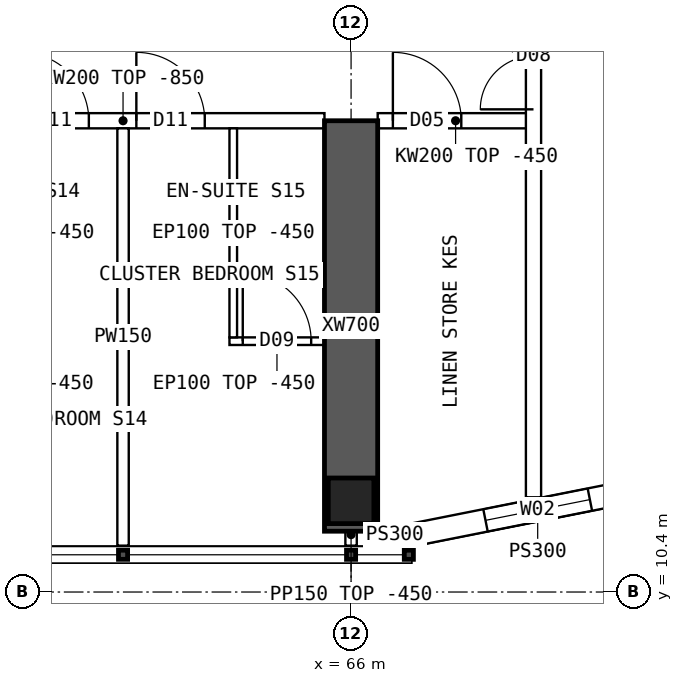
"""IFC4 building model, lengths in metres.
Left out: names, types, materials, properties, quantities, classifications, styles, units other than length and angle.
Written with IfcOpenShell. Run it as: python <this file> out.ifc"""

import sys

from ifc_helpers import new_model, si_unit, direction, frame, frame_2d, origin, origin_2d, place, context, subcontext, project, spatial, polyline, rectangle, hollow_rectangle, outline, extrude, element, fill, save


model = new_model("IFC4")
c1 = context("Model", 3, precision=1e-05, world=origin(), true_north=direction((0.0, 1.0)))
c2 = subcontext(c1, "Body", "Model", "MODEL_VIEW")
j1 = project(units=[si_unit("LENGTHUNIT", "METRE"), si_unit("PLANEANGLEUNIT", "RADIAN")], contexts=[c1])
p1 = place(None, origin())
s1 = spatial("IfcSite", under=j1, at=p1, CompositionType="ELEMENT")
p2 = place(p1, origin())
s2 = spatial("IfcBuilding", under=s1, at=p2, CompositionType="ELEMENT")
p3 = place(p2, frame((0.0, 0.0, 242.8)))
s3 = spatial("IfcBuildingStorey", under=s2, at=p3, CompositionType="ELEMENT", Elevation=242.8)
p4 = place(p3, frame((66.0, 11.6, 0.0), z_axis=(0.0, 0.0, 1.0), x_axis=(1.0, 0.0, 0.0)))
e1 = element("IfcColumn", 1, at=p4, inside=s3, PredefinedType="COLUMN", context=c2, shape_type="SweptSolid", body=[
    extrude(hollow_rectangle(XDim=0.6, YDim=0.6, WallThickness=0.06, at=origin_2d()), origin(), (0.0, 0.0, 1.0), 3.75),
])
p5 = place(p3, frame((66.0, 11.2, 0.0), z_axis=(0.0, 0.0, 1.0), x_axis=(0.0, 1.0, 0.0)))
e2 = element("IfcWall", 2, at=p5, inside=s3, PredefinedType="SHEAR", context=c2, shape_type="SweptSolid", body=[
    extrude(rectangle(XDim=5.4, YDim=0.7, at=frame_2d((2.7, 0.0))), origin(), (0.0, 0.0, 1.0), 3.75),
])
p6 = place(p3, frame((66.8, 11.15, 0.0), z_axis=(0.0, 0.0, 1.0), x_axis=(0.98078325777, 0.195100490205, 0.0)))
e3 = element("IfcWall", 3, at=p6, inside=s3, PredefinedType="SOLIDWALL", context=c2, shape_type="SweptSolid", body=[
    extrude(outline(polyline([(-0.03, -0.15), (3.405, -0.15), (3.345, 0.15), (0.03, 0.15), (-0.03, -0.15)])), origin(), (0.0, 0.0, 1.0), 3.3),
])
p7 = place(p6, frame((0.988, 0.0, 0.9)))
e4 = element("IfcOpeningElement", 4, at=p7, cuts=e3, PredefinedType="OPENING", context=c2, shape_type="SweptSolid", body=[
    extrude(rectangle(XDim=1.4, YDim=1.8, at=frame_2d((0.7, 0.9))), frame((0.0, 0.16, 0.0), z_axis=(0.0, -1.0, 0.0), x_axis=(1.0, 0.0, 0.0)), (0.0, 0.0, 1.0), 0.32),
])
p8 = place(p3, frame((66.8, 11.15, 0.0), z_axis=(0.0, 0.0, 1.0), x_axis=(-1.0, 0.0, 0.0)))
e5 = element("IfcWall", 5, at=p8, inside=s3, PredefinedType="SOLIDWALL", context=c2, shape_type="SweptSolid", body=[
    extrude(rectangle(XDim=0.45, YDim=0.3, at=frame_2d((0.225, 0.0))), origin(), (0.0, 0.0, 1.0), 3.3),
])
p9 = place(p3, frame((60.35, 16.6, 0.0), z_axis=(0.0, 0.0, 1.0), x_axis=(1.0, 0.0, 0.0)))
e6 = element("IfcWall", 6, at=p9, inside=s3, PredefinedType="SOLIDWALL", context=c2, shape_type="SweptSolid", body=[
    extrude(outline(polyline([(0.0, 0.0), (5.3, 0.0), (5.3, 2.9), (0.0, 2.9), (0.0, 0.0)])), frame((0.0, 0.1, 0.0), z_axis=(0.0, -1.0, 0.0), x_axis=(1.0, 0.0, 0.0)), (0.0, 0.0, 1.0), 0.2),
])
p10 = place(p9, frame((1.3, 0.0, 0.0)))
e7 = element("IfcOpeningElement", 7, at=p10, cuts=e6, PredefinedType="OPENING", context=c2, shape_type="SweptSolid", body=[
    extrude(rectangle(XDim=0.9, YDim=2.1, at=frame_2d((0.45, 1.05))), frame((0.0, 0.11, 0.0), z_axis=(0.0, -1.0, 0.0), x_axis=(1.0, 0.0, 0.0)), (0.0, 0.0, 1.0), 0.22),
])
p11 = place(p9, frame((2.825, 0.0, 0.0)))
e8 = element("IfcOpeningElement", 8, at=p11, cuts=e6, PredefinedType="OPENING", context=c2, shape_type="SweptSolid", body=[
    extrude(rectangle(XDim=0.9, YDim=2.1, at=frame_2d((0.45, 1.05))), frame((0.0, 0.11, 0.0), z_axis=(0.0, -1.0, 0.0), x_axis=(1.0, 0.0, 0.0)), (0.0, 0.0, 1.0), 0.22),
])
p12 = place(p3, frame((66.35, 16.6, 0.0), z_axis=(0.0, 0.0, 1.0), x_axis=(1.0, 0.0, 0.0)))
e9 = element("IfcWall", 9, at=p12, inside=s3, PredefinedType="SOLIDWALL", context=c2, shape_type="SweptSolid", body=[
    extrude(rectangle(XDim=2.05, YDim=0.2, at=frame_2d((1.025, 0.0))), origin(), (0.0, 0.0, 1.0), 3.3),
])
p13 = place(p12, frame((0.2, 0.0, 0.0)))
e10 = element("IfcOpeningElement", 10, at=p13, cuts=e9, PredefinedType="OPENING", context=c2, shape_type="SweptSolid", body=[
    extrude(rectangle(XDim=0.9, YDim=2.1, at=frame_2d((0.45, 1.05))), frame((0.0, 0.11, 0.0), z_axis=(0.0, -1.0, 0.0), x_axis=(1.0, 0.0, 0.0)), (0.0, 0.0, 1.0), 0.22),
])
p14 = place(p3, frame((63.0, 11.01, 0.0), z_axis=(0.0, 0.0, 1.0), x_axis=(0.0, 1.0, 0.0)))
e11 = element("IfcWall", 11, at=p14, inside=s3, PredefinedType="PARTITIONING", context=c2, shape_type="SweptSolid", body=[
    extrude(outline(polyline([(0.0, 0.0), (5.49, 0.0), (5.49, 2.9), (5.442, 2.9), (5.44, 3.3), (0.792, 3.3), (0.79, 2.9), (0.392, 2.9), (0.39, 3.3), (0.0, 3.3), (0.0, 0.0)])), frame((0.0, 0.075, 0.0), z_axis=(0.0, -1.0, 0.0), x_axis=(1.0, 0.0, 0.0)), (0.0, 0.0, 1.0), 0.15),
])
p15 = place(p3, frame((65.65, 13.7, 0.0), z_axis=(0.0, 0.0, 1.0), x_axis=(-1.0, 0.0, 0.0)))
e12 = element("IfcWall", 12, at=p15, inside=s3, PredefinedType="PARTITIONING", context=c2, shape_type="SweptSolid", body=[
    extrude(rectangle(XDim=1.25, YDim=0.1, at=frame_2d((0.625, 0.0))), origin(), (0.0, 0.0, 1.0), 3.3),
])
p16 = place(p15, frame((0.175, 0.0, 0.0)))
e13 = element("IfcOpeningElement", 13, at=p16, cuts=e12, PredefinedType="OPENING", context=c2, shape_type="SweptSolid", body=[
    extrude(rectangle(XDim=0.9, YDim=2.1, at=frame_2d((0.45, 1.05))), frame((0.0, 0.06, 0.0), z_axis=(0.0, -1.0, 0.0), x_axis=(1.0, 0.0, 0.0)), (0.0, 0.0, 1.0), 0.12),
])
p17 = place(p3, frame((64.45, 13.75, 0.0), z_axis=(0.0, 0.0, 1.0), x_axis=(0.0, 1.0, 0.0)))
e14 = element("IfcWall", 14, at=p17, inside=s3, PredefinedType="PARTITIONING", context=c2, shape_type="SweptSolid", body=[
    extrude(outline(polyline([(0.0, 0.0), (2.75, 0.0), (2.75, 2.9), (2.702, 2.9), (2.7, 3.3), (0.0, 3.3), (0.0, 0.0)])), frame((0.0, 0.05, 0.0), z_axis=(0.0, -1.0, 0.0), x_axis=(1.0, 0.0, 0.0)), (0.0, 0.0, 1.0), 0.1),
])
p18 = place(p3, frame((68.4, 11.646, 0.0), z_axis=(0.0, 0.0, 1.0), x_axis=(0.0, 1.0, 0.0)))
e15 = element("IfcWall", 15, at=p18, inside=s3, PredefinedType="SOLIDWALL", context=c2, shape_type="SweptSolid", body=[
    extrude(rectangle(XDim=40.708, YDim=0.2, at=frame_2d((20.354, 0.0))), origin(), (0.0, 0.0, 1.0), 3.3),
])
p19 = place(p18, frame((5.104, 0.0, 0.0)))
e16 = element("IfcOpeningElement", 16, at=p19, cuts=e15, PredefinedType="OPENING", context=c2, shape_type="SweptSolid", body=[
    extrude(rectangle(XDim=1.4, YDim=2.1, at=frame_2d((0.7, 1.05))), frame((0.0, 0.11, 0.0), z_axis=(0.0, -1.0, 0.0), x_axis=(1.0, 0.0, 0.0)), (0.0, 0.0, 1.0), 0.22),
])
p20 = place(p18, frame((34.104, 0.0, 0.0)))
e17 = element("IfcOpeningElement", 17, at=p20, cuts=e15, PredefinedType="OPENING", context=c2, shape_type="SweptSolid", body=[
    extrude(rectangle(XDim=1.4, YDim=2.1, at=frame_2d((0.7, 1.05))), frame((0.0, 0.11, 0.0), z_axis=(0.0, -1.0, 0.0), x_axis=(1.0, 0.0, 0.0)), (0.0, 0.0, 1.0), 0.22),
])
p21 = place(p3, frame((66.0, 11.3, 0.0), z_axis=(0.0, 0.0, 1.0), x_axis=(0.0, -1.0, 0.0)))
e18 = element("IfcWall", 18, at=p21, inside=s3, PredefinedType="PARTITIONING", context=c2, shape_type="SweptSolid", body=[
    extrude(rectangle(XDim=0.29, YDim=0.15, at=frame_2d((0.145, 0.0))), origin(), (0.0, 0.0, 1.0), 3.3),
])
p22 = place(p7, origin())
e19 = element("IfcWindow", 19, at=p22, inside=s3, PartitioningType="SINGLE_PANEL", PredefinedType="WINDOW", context=c2, shape_type="SweptSolid", body=[
    extrude(rectangle(XDim=1.4, YDim=1.8, at=frame_2d((0.7, 0.9))), frame((0.0, 0.03, 0.0), z_axis=(0.0, -1.0, 0.0), x_axis=(1.0, 0.0, 0.0)), (0.0, 0.0, 1.0), 0.06),
])
fill(e4, e19)
p23 = place(p10, origin())
e20 = element("IfcDoor", 20, at=p23, inside=s3, OperationType="SINGLE_SWING_LEFT", PredefinedType="DOOR", context=c2, shape_type="SweptSolid", body=[
    extrude(rectangle(XDim=0.9, YDim=2.1, at=frame_2d((0.45, 1.05))), frame((0.0, 0.025, 0.0), z_axis=(0.0, -1.0, 0.0), x_axis=(1.0, 0.0, 0.0)), (0.0, 0.0, 1.0), 0.05),
])
fill(e7, e20)
p24 = place(p16, origin())
e21 = element("IfcDoor", 21, at=p24, inside=s3, OperationType="SINGLE_SWING_RIGHT", PredefinedType="DOOR", context=c2, shape_type="SweptSolid", body=[
    extrude(rectangle(XDim=0.9, YDim=2.1, at=frame_2d((0.45, 1.05))), frame((0.0, 0.025, 0.0), z_axis=(0.0, -1.0, 0.0), x_axis=(1.0, 0.0, 0.0)), (0.0, 0.0, 1.0), 0.05),
])
fill(e13, e21)
p25 = place(p11, origin())
e22 = element("IfcDoor", 22, at=p25, inside=s3, OperationType="SINGLE_SWING_LEFT", PredefinedType="DOOR", context=c2, shape_type="SweptSolid", body=[
    extrude(rectangle(XDim=0.9, YDim=2.1, at=frame_2d((0.45, 1.05))), frame((0.0, 0.025, 0.0), z_axis=(0.0, -1.0, 0.0), x_axis=(1.0, 0.0, 0.0)), (0.0, 0.0, 1.0), 0.05),
])
fill(e8, e22)
p26 = place(p19, origin())
e23 = element("IfcDoor", 23, at=p26, inside=s3, OperationType="DOUBLE_DOOR_SINGLE_SWING", PredefinedType="DOOR", context=c2, shape_type="SweptSolid", body=[
    extrude(rectangle(XDim=1.4, YDim=2.1, at=frame_2d((0.7, 1.05))), frame((0.0, 0.025, 0.0), z_axis=(0.0, -1.0, 0.0), x_axis=(1.0, 0.0, 0.0)), (0.0, 0.0, 1.0), 0.05),
])
fill(e16, e23)
p27 = place(p13, origin())
e24 = element("IfcDoor", 24, at=p27, inside=s3, OperationType="SINGLE_SWING_LEFT", PredefinedType="DOOR", context=c2, shape_type="SweptSolid", body=[
    extrude(rectangle(XDim=0.9, YDim=2.1, at=frame_2d((0.45, 1.05))), frame((0.0, 0.025, 0.0), z_axis=(0.0, -1.0, 0.0), x_axis=(1.0, 0.0, 0.0)), (0.0, 0.0, 1.0), 0.05),
])
fill(e10, e24)
save(model, sys.argv[1])
